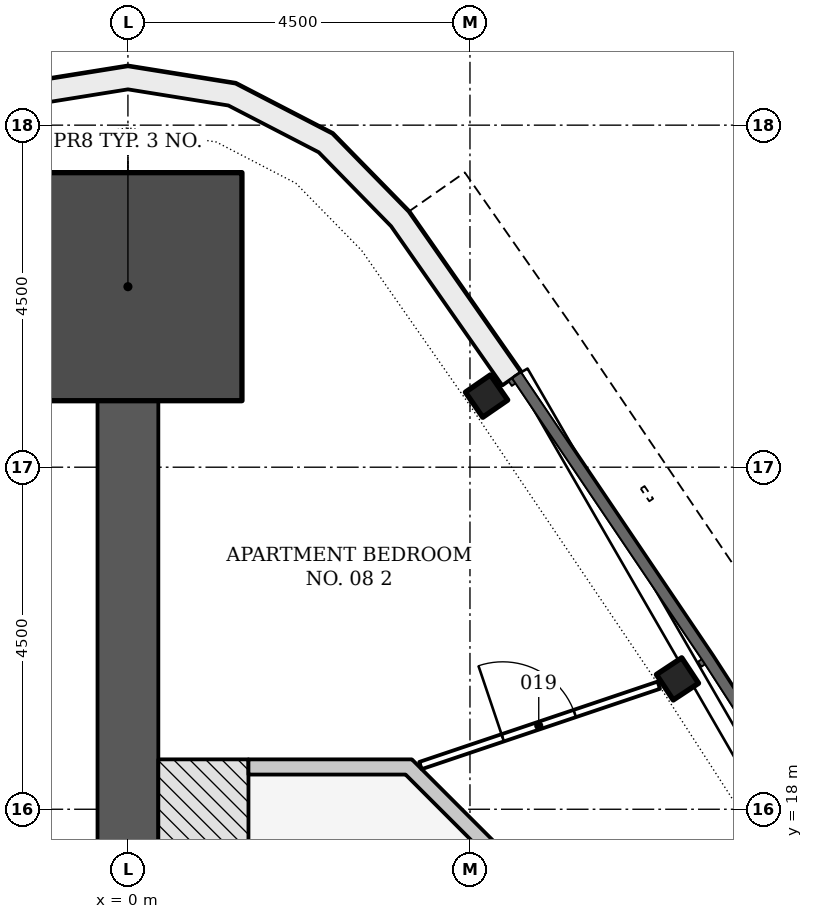
"""IFC4 building model, lengths in metres.
Left out: names, types, materials, properties, quantities, classifications, styles, units other than length and angle.
Written with IfcOpenShell. Run it as: python <this file> out.ifc"""

import sys

from ifc_helpers import new_model, si_unit, direction, frame, frame_2d, origin, origin_2d, place, context, subcontext, project, spatial, polyline, rectangle, i_section, outline, extrude, element, fill, save


model = new_model("IFC4")
c1 = context("Model", 3, precision=1e-05, world=origin(), true_north=direction((0.0, 1.0)))
c2 = subcontext(c1, "Body", "Model", "MODEL_VIEW")
j1 = project(units=[si_unit("LENGTHUNIT", "METRE"), si_unit("PLANEANGLEUNIT", "RADIAN")], contexts=[c1])
p1 = place(None, origin())
s1 = spatial("IfcSite", under=j1, at=p1, CompositionType="ELEMENT")
p2 = place(p1, origin())
s2 = spatial("IfcBuilding", under=s1, at=p2, CompositionType="ELEMENT")
p3 = place(p2, frame((0.0, 0.0, 109.5)))
s3 = spatial("IfcBuildingStorey", under=s2, at=p3, CompositionType="ELEMENT", Elevation=109.5)
p4 = place(p3, frame((0.0, 11.456, -0.2), z_axis=(0.0, 0.0, 1.0), x_axis=(0.0, 1.0, 0.0)))
e1 = element("IfcWall", 1, at=p4, inside=s3, PredefinedType="SHEAR", context=c2, shape_type="SweptSolid", body=[
    extrude(rectangle(XDim=11.919, YDim=0.8, at=frame_2d((5.959, 0.0))), origin(), (0.0, 0.0, 1.0), 3.6),
])
p5 = place(p3, frame((0.0, 24.875, -0.2), z_axis=(0.0, 0.0, 1.0), x_axis=(0.0, 1.0, 0.0)))
e2 = element("IfcColumn", 2, at=p5, inside=s3, PredefinedType="COLUMN", context=c2, shape_type="SweptSolid", body=[
    extrude(rectangle(XDim=3.0, YDim=3.0, at=origin_2d()), origin(), (0.0, 0.0, 1.0), 3.6),
])
for number, where, z_axis, x_axis in (
    (3, (7.23, 19.715, -0.2), (0.0, 0.0, 1.0), (-0.551, 0.834, 0.0)),
    (4, (4.718, 23.435, -0.2), (0.0, 0.0, 1.0), (-0.568, 0.823, 0.0)),
):
    element("IfcColumn", number, at=place(p3, frame(where, z_axis=z_axis, x_axis=x_axis)), inside=s3, PredefinedType="COLUMN", context=c2, shape_type="SweptSolid", body=[
        extrude(i_section(OverallWidth=0.401, OverallDepth=0.399, WebThickness=0.025, FlangeThickness=0.04, FilletRadius=0.015, at=origin_2d()), origin(), (0.0, 0.0, 1.0), 3.6),
    ])
p6 = place(p3, origin())
e5 = element("IfcWall", 5, at=p6, inside=s3, PredefinedType="NOTDEFINED", context=c2, shape_type="SweptSolid", body=[
    extrude(outline(polyline([(5.171, 23.748), (3.694, 25.863), (2.69, 26.888), (1.417, 27.547), (0.0, 27.775), (-1.417, 27.547), (-2.69, 26.888), (-3.694, 25.863), (-5.171, 23.748), (-4.925, 23.576), (-3.462, 25.67), (-2.51, 26.644), (-1.321, 27.259), (0.0, 27.471), (1.321, 27.259), (2.51, 26.644), (3.462, 25.67), (4.925, 23.576), (5.171, 23.748)])), origin(), (0.0, 0.0, 1.0), 3.3),
])
p7 = place(p3, frame((0.993, 11.456, -0.2), z_axis=(0.0, 0.0, 1.0), x_axis=(0.0, 1.0, 0.0)))
e6 = element("IfcWall", 6, at=p7, inside=s3, PredefinedType="SHEAR", context=c2, shape_type="SweptSolid", body=[
    extrude(rectangle(XDim=7.2, YDim=1.186, at=frame_2d((3.6, 0.0))), origin(), (0.0, 0.0, 1.0), 3.6),
])
p8 = place(p3, frame((0.0, 0.0, -0.2)))
e7 = element("IfcWall", 7, at=p8, inside=s3, PredefinedType="SHEAR", context=c2, shape_type="SweptSolid", body=[
    extrude(outline(polyline([(5.336, 17.056), (3.736, 18.656), (1.586, 18.656), (1.586, 18.456), (3.653, 18.456), (5.135, 16.974), (5.135, 17.056), (5.135, 17.056), (5.135, 17.056), (5.135, 17.056), (5.135, 17.056), (5.135, 17.056), (5.135, 17.056), (5.135, 17.056), (5.135, 17.056), (5.135, 17.056), (5.135, 17.056), (5.135, 17.056), (5.135, 17.056), (5.135, 17.056), (5.135, 17.056), (5.135, 17.056), (5.135, 17.056), (5.336, 17.056)])), origin(), (0.0, 0.0, 1.0), 3.6),
])
p9 = place(p3, frame((3.849, 18.575, 0.0), z_axis=(0.0, 0.0, 1.0), x_axis=(0.947578304543, 0.319523640375, 0.0)))
e8 = element("IfcWall", 8, at=p9, inside=s3, PredefinedType="PARTITIONING", context=c2, shape_type="SweptSolid", body=[
    extrude(rectangle(XDim=3.309, YDim=0.1, at=frame_2d((1.655, 0.0))), origin(), (0.0, 0.0, 1.0), 2.974),
])
p10 = place(p9, frame((1.142, 0.0, 0.0)))
e9 = element("IfcOpeningElement", 9, at=p10, cuts=e8, PredefinedType="OPENING", context=c2, shape_type="SweptSolid", body=[
    extrude(rectangle(XDim=1.0, YDim=2.1, at=frame_2d((0.5, 1.05))), frame((0.0, 0.06, 0.0), z_axis=(0.0, -1.0, 0.0), x_axis=(1.0, 0.0, 0.0)), (0.0, 0.0, 1.0), 0.12),
])
p11 = place(p10, origin())
e10 = element("IfcDoor", 10, at=p11, inside=s3, OperationType="SINGLE_SWING_LEFT", PredefinedType="DOOR", context=c2, shape_type="SweptSolid", body=[
    extrude(rectangle(XDim=1.0, YDim=2.1, at=frame_2d((0.5, 1.05))), frame((0.0, 0.025, 0.0), z_axis=(0.0, -1.0, 0.0), x_axis=(1.0, 0.0, 0.0)), (0.0, 0.0, 1.0), 0.05),
])
fill(e9, e10)
save(model, sys.argv[1])
